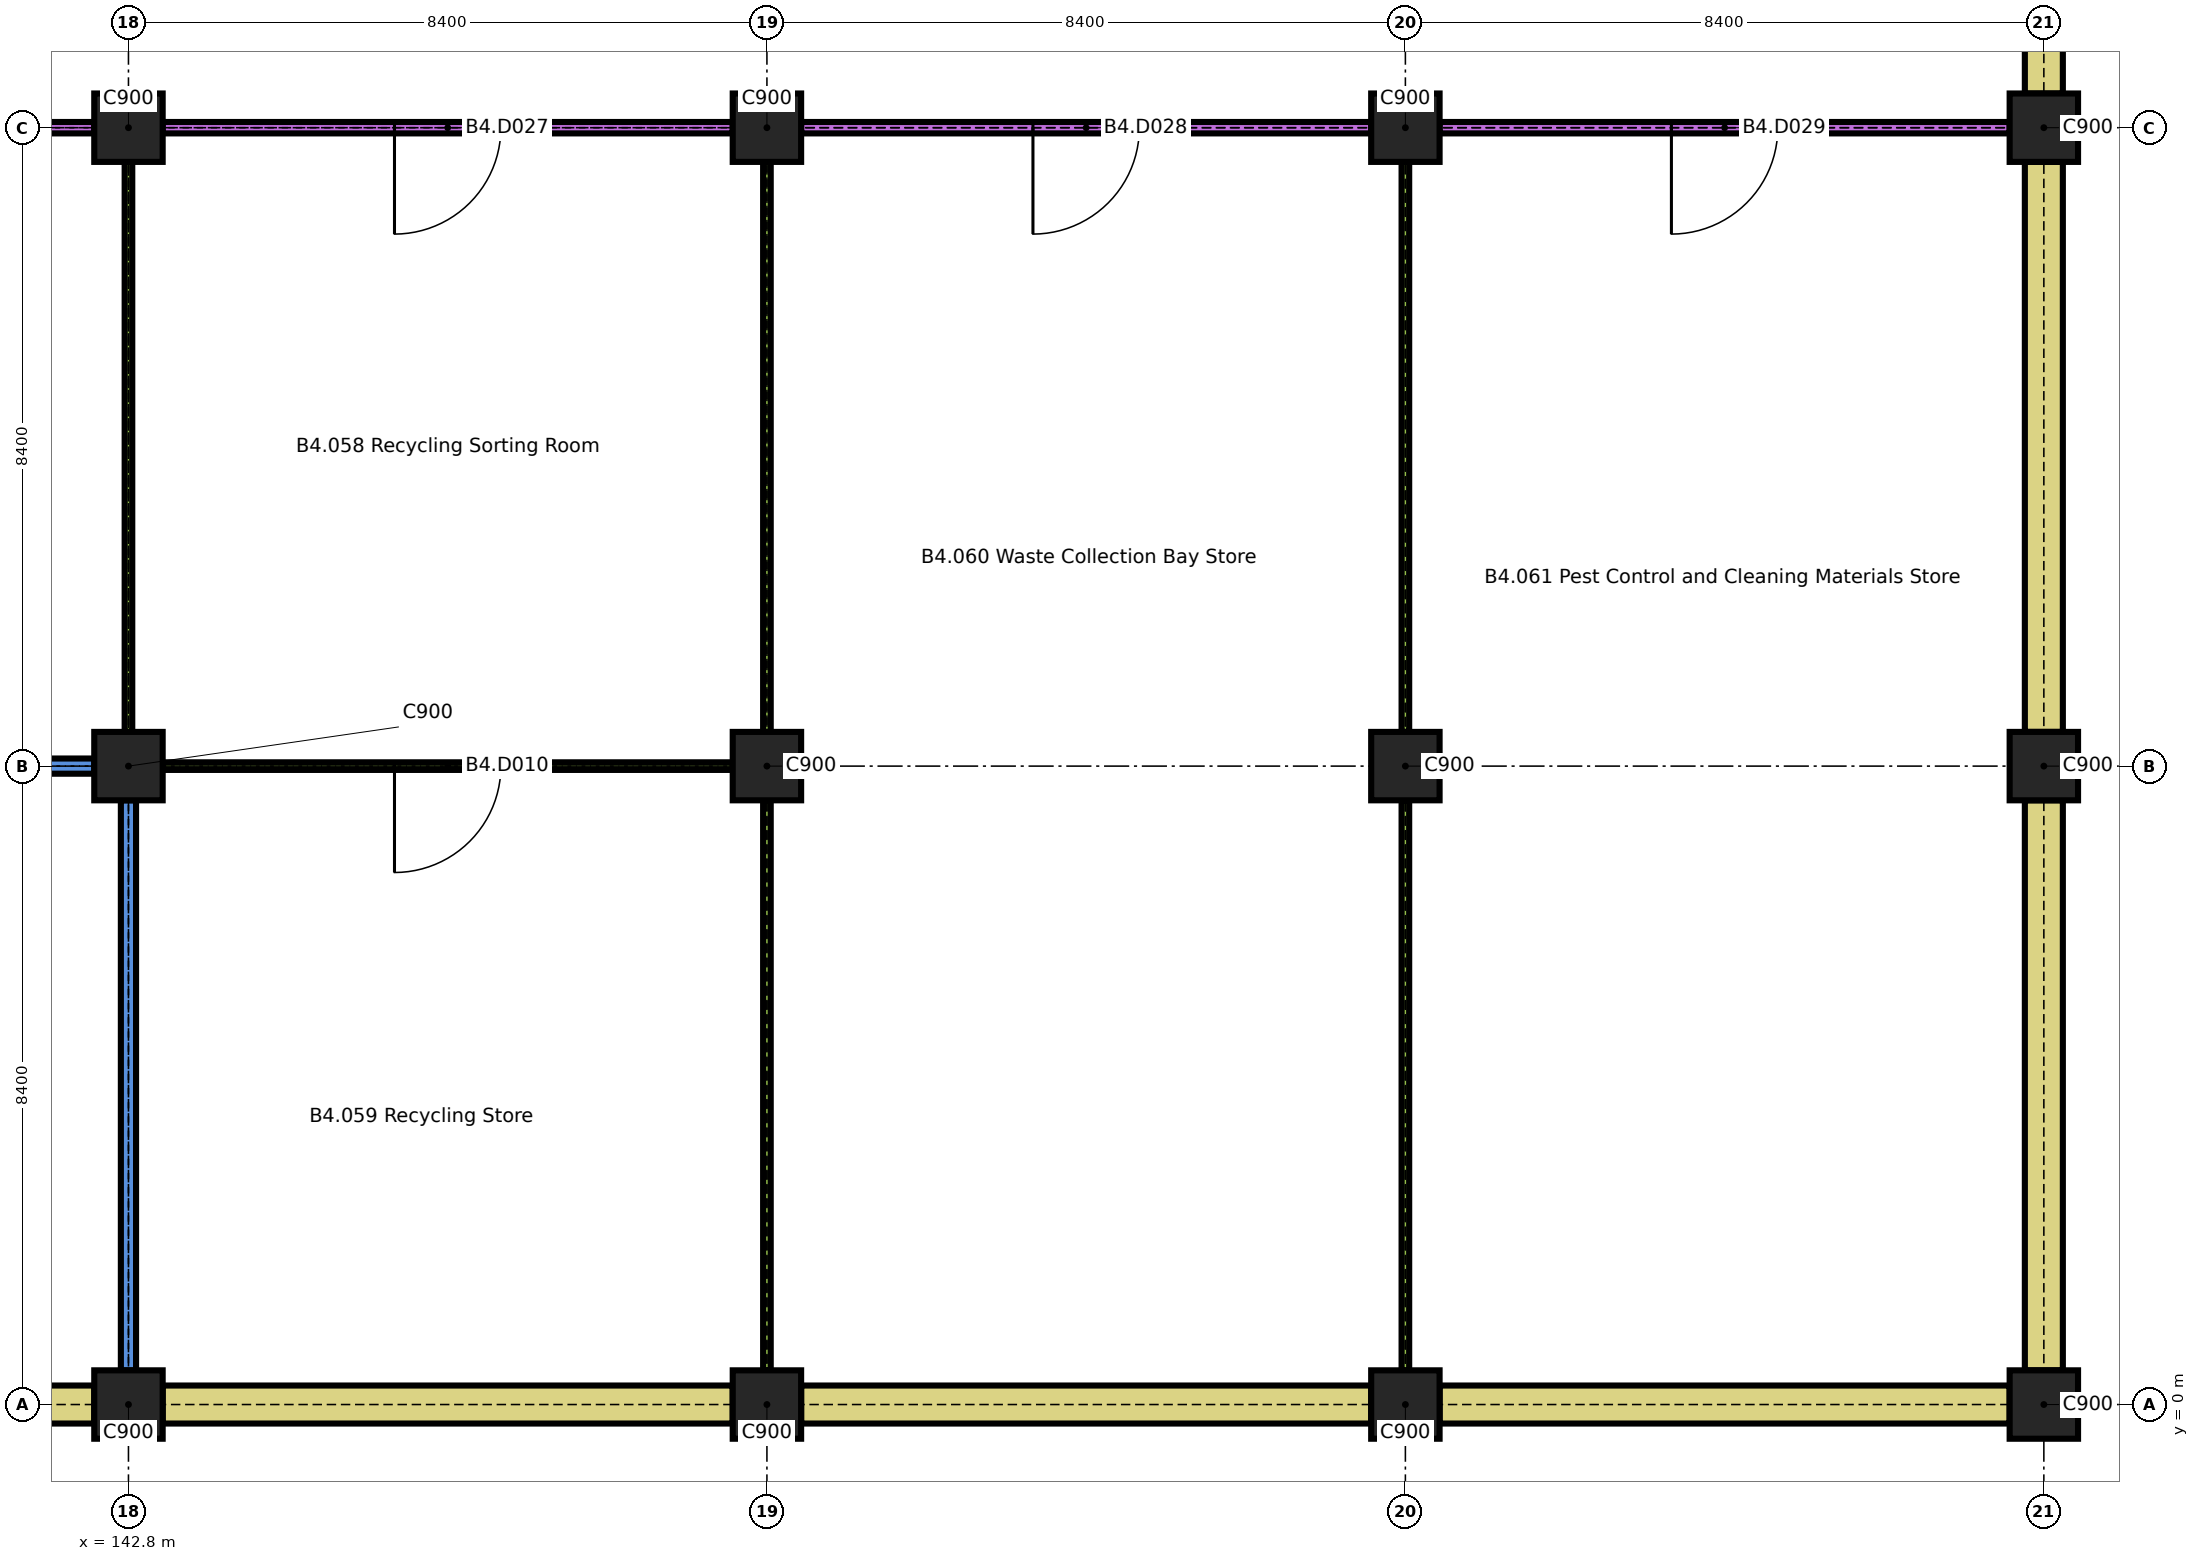
"""IFC4 building model, lengths in metres.
Left out: names, types, materials, properties, quantities, classifications, styles, units other than length and angle.
Written with IfcOpenShell. Run it as: python <this file> out.ifc"""

import sys

from ifc_helpers import new_model, si_unit, direction, frame, frame_2d, origin, origin_2d, place, context, subcontext, project, spatial, rectangle, extrude, element, fill, save


model = new_model("IFC4")
c1 = context("Model", 3, precision=1e-05, world=origin(), true_north=direction((0.0, 1.0)))
c2 = subcontext(c1, "Body", "Model", "MODEL_VIEW")
j1 = project(units=[si_unit("LENGTHUNIT", "METRE"), si_unit("PLANEANGLEUNIT", "RADIAN")], contexts=[c1])
p1 = place(None, origin())
s1 = spatial("IfcSite", under=j1, at=p1, CompositionType="ELEMENT")
p2 = place(p1, origin())
s2 = spatial("IfcBuilding", under=s1, at=p2, CompositionType="ELEMENT")
p3 = place(p2, frame((0.0, 0.0, -15.0)))
s3 = spatial("IfcBuildingStorey", under=s2, at=p3, CompositionType="ELEMENT", Elevation=-15.0)
for number, where, z_axis, x_axis in (
    (1, (142.8, 0.0, 0.0), (0.0, 0.0, 1.0), (1.0, 0.0, 0.0)),
    (2, (151.2, 0.0, 0.0), (0.0, 0.0, 1.0), (1.0, 0.0, 0.0)),
    (3, (159.6, 0.0, 0.0), (0.0, 0.0, 1.0), (1.0, 0.0, 0.0)),
    (4, (168.0, 0.0, 0.0), (0.0, 0.0, 1.0), (1.0, 0.0, 0.0)),
    (5, (142.8, 8.4, 0.0), (0.0, 0.0, 1.0), (1.0, 0.0, 0.0)),
    (6, (151.2, 8.4, 0.0), (0.0, 0.0, 1.0), (1.0, 0.0, 0.0)),
    (7, (159.6, 8.4, 0.0), (0.0, 0.0, 1.0), (1.0, 0.0, 0.0)),
    (8, (168.0, 8.4, 0.0), (0.0, 0.0, 1.0), (1.0, 0.0, 0.0)),
    (9, (142.8, 16.8, 0.0), (0.0, 0.0, 1.0), (1.0, 0.0, 0.0)),
    (10, (151.2, 16.8, 0.0), (0.0, 0.0, 1.0), (1.0, 0.0, 0.0)),
    (11, (159.6, 16.8, 0.0), (0.0, 0.0, 1.0), (1.0, 0.0, 0.0)),
    (12, (168.0, 16.8, 0.0), (0.0, 0.0, 1.0), (1.0, 0.0, 0.0)),
):
    element("IfcColumn", number, at=place(p3, frame(where, z_axis=z_axis, x_axis=x_axis)), inside=s3, PredefinedType="COLUMN", context=c2, shape_type="SweptSolid", body=[
        extrude(rectangle(XDim=0.9, YDim=0.9, at=origin_2d()), origin(), (0.0, 0.0, 1.0), 3.2),
    ])
for number, where, z_axis, x_axis in (
    (13, (134.85, 0.0, 0.0), (0.0, 0.0, 1.0), (1.0, 0.0, 0.0)),
    (14, (143.25, 0.0, 0.0), (0.0, 0.0, 1.0), (1.0, 0.0, 0.0)),
    (15, (151.65, 0.0, 0.0), (0.0, 0.0, 1.0), (1.0, 0.0, 0.0)),
    (16, (160.05, 0.0, 0.0), (0.0, 0.0, 1.0), (1.0, 0.0, 0.0)),
    (17, (168.0, 0.45, 0.0), (0.0, 0.0, 1.0), (0.0, 1.0, 0.0)),
    (18, (168.0, 8.85, 0.0), (0.0, 0.0, 1.0), (0.0, 1.0, 0.0)),
):
    element("IfcWall", number, at=place(p3, frame(where, z_axis=z_axis, x_axis=x_axis)), inside=s3, PredefinedType="SOLIDWALL", context=c2, shape_type="SweptSolid", body=[
        extrude(rectangle(XDim=7.5, YDim=0.5, at=frame_2d((3.75, 0.0))), origin(), (0.0, 0.0, 1.0), 3.2),
    ])
p4 = place(p3, frame((168.0, 17.25, 0.0), z_axis=(0.0, 0.0, 1.0), x_axis=(0.0, 1.0, 0.0)))
e19 = element("IfcWall", 19, at=p4, inside=s3, PredefinedType="SOLIDWALL", context=c2, shape_type="SweptSolid", body=[
    extrude(rectangle(XDim=16.6, YDim=0.5, at=frame_2d((8.3, 0.0))), origin(), (0.0, 0.0, 1.0), 3.2),
])
p5 = place(p3, frame((134.85, 8.4, 0.0), z_axis=(0.0, 0.0, 1.0), x_axis=(1.0, 0.0, 0.0)))
e20 = element("IfcWall", 20, at=p5, inside=s3, PredefinedType="PARTITIONING", context=c2, shape_type="SweptSolid", body=[
    extrude(rectangle(XDim=7.5, YDim=0.2, at=frame_2d((3.75, 0.0))), origin(), (0.0, 0.0, 1.0), 3.2),
])
p6 = place(p5, frame((3.05, 0.0, 0.0)))
e21 = element("IfcOpeningElement", 21, at=p6, cuts=e20, PredefinedType="OPENING", context=c2, shape_type="SweptSolid", body=[
    extrude(rectangle(XDim=1.4, YDim=2.1, at=frame_2d((0.7, 1.05))), frame((0.0, 0.11, 0.0), z_axis=(0.0, -1.0, 0.0), x_axis=(1.0, 0.0, 0.0)), (0.0, 0.0, 1.0), 0.22),
])
p7 = place(p3, frame((143.25, 8.4, 0.0), z_axis=(0.0, 0.0, 1.0), x_axis=(1.0, 0.0, 0.0)))
e22 = element("IfcWall", 22, at=p7, inside=s3, PredefinedType="PARTITIONING", context=c2, shape_type="SweptSolid", body=[
    extrude(rectangle(XDim=7.5, YDim=0.1, at=frame_2d((3.75, 0.0))), origin(), (0.0, 0.0, 1.0), 3.2),
])
p8 = place(p7, frame((3.05, 0.0, 0.0)))
e23 = element("IfcOpeningElement", 23, at=p8, cuts=e22, PredefinedType="OPENING", context=c2, shape_type="SweptSolid", body=[
    extrude(rectangle(XDim=1.4, YDim=2.1, at=frame_2d((0.7, 1.05))), frame((0.0, 0.06, 0.0), z_axis=(0.0, -1.0, 0.0), x_axis=(1.0, 0.0, 0.0)), (0.0, 0.0, 1.0), 0.12),
])
p9 = place(p3, frame((134.85, 16.8, 0.0), z_axis=(0.0, 0.0, 1.0), x_axis=(1.0, 0.0, 0.0)))
e24 = element("IfcWall", 24, at=p9, inside=s3, PredefinedType="PARTITIONING", context=c2, shape_type="SweptSolid", body=[
    extrude(rectangle(XDim=7.5, YDim=0.15, at=frame_2d((3.75, 0.0))), origin(), (0.0, 0.0, 1.0), 3.2),
])
p10 = place(p9, frame((3.05, 0.0, 0.0)))
e25 = element("IfcOpeningElement", 25, at=p10, cuts=e24, PredefinedType="OPENING", context=c2, shape_type="SweptSolid", body=[
    extrude(rectangle(XDim=1.4, YDim=2.1, at=frame_2d((0.7, 1.05))), frame((0.0, 0.085, 0.0), z_axis=(0.0, -1.0, 0.0), x_axis=(1.0, 0.0, 0.0)), (0.0, 0.0, 1.0), 0.17),
])
p11 = place(p3, frame((143.25, 16.8, 0.0), z_axis=(0.0, 0.0, 1.0), x_axis=(1.0, 0.0, 0.0)))
e26 = element("IfcWall", 26, at=p11, inside=s3, PredefinedType="PARTITIONING", context=c2, shape_type="SweptSolid", body=[
    extrude(rectangle(XDim=7.5, YDim=0.15, at=frame_2d((3.75, 0.0))), origin(), (0.0, 0.0, 1.0), 3.2),
])
p12 = place(p11, frame((3.05, 0.0, 0.0)))
e27 = element("IfcOpeningElement", 27, at=p12, cuts=e26, PredefinedType="OPENING", context=c2, shape_type="SweptSolid", body=[
    extrude(rectangle(XDim=1.4, YDim=2.1, at=frame_2d((0.7, 1.05))), frame((0.0, 0.085, 0.0), z_axis=(0.0, -1.0, 0.0), x_axis=(1.0, 0.0, 0.0)), (0.0, 0.0, 1.0), 0.17),
])
p13 = place(p3, frame((151.65, 16.8, 0.0), z_axis=(0.0, 0.0, 1.0), x_axis=(1.0, 0.0, 0.0)))
e28 = element("IfcWall", 28, at=p13, inside=s3, PredefinedType="PARTITIONING", context=c2, shape_type="SweptSolid", body=[
    extrude(rectangle(XDim=7.5, YDim=0.15, at=frame_2d((3.75, 0.0))), origin(), (0.0, 0.0, 1.0), 3.2),
])
p14 = place(p13, frame((3.05, 0.0, 0.0)))
e29 = element("IfcOpeningElement", 29, at=p14, cuts=e28, PredefinedType="OPENING", context=c2, shape_type="SweptSolid", body=[
    extrude(rectangle(XDim=1.4, YDim=2.1, at=frame_2d((0.7, 1.05))), frame((0.0, 0.085, 0.0), z_axis=(0.0, -1.0, 0.0), x_axis=(1.0, 0.0, 0.0)), (0.0, 0.0, 1.0), 0.17),
])
p15 = place(p3, frame((160.05, 16.8, 0.0), z_axis=(0.0, 0.0, 1.0), x_axis=(1.0, 0.0, 0.0)))
e30 = element("IfcWall", 30, at=p15, inside=s3, PredefinedType="PARTITIONING", context=c2, shape_type="SweptSolid", body=[
    extrude(rectangle(XDim=7.5, YDim=0.15, at=frame_2d((3.75, 0.0))), origin(), (0.0, 0.0, 1.0), 3.2),
])
p16 = place(p15, frame((3.05, 0.0, 0.0)))
e31 = element("IfcOpeningElement", 31, at=p16, cuts=e30, PredefinedType="OPENING", context=c2, shape_type="SweptSolid", body=[
    extrude(rectangle(XDim=1.4, YDim=2.1, at=frame_2d((0.7, 1.05))), frame((0.0, 0.085, 0.0), z_axis=(0.0, -1.0, 0.0), x_axis=(1.0, 0.0, 0.0)), (0.0, 0.0, 1.0), 0.17),
])
p17 = place(p3, frame((142.8, 0.45, 0.0), z_axis=(0.0, 0.0, 1.0), x_axis=(0.0, 1.0, 0.0)))
e32 = element("IfcWall", 32, at=p17, inside=s3, PredefinedType="PARTITIONING", context=c2, shape_type="SweptSolid", body=[
    extrude(rectangle(XDim=7.5, YDim=0.2, at=frame_2d((3.75, 0.0))), origin(), (0.0, 0.0, 1.0), 3.2),
])
for number, where, z_axis, x_axis in (
    (33, (142.8, 8.85, 0.0), (0.0, 0.0, 1.0), (0.0, 1.0, 0.0)),
    (34, (151.2, 0.45, 0.0), (0.0, 0.0, 1.0), (0.0, 1.0, 0.0)),
    (35, (151.2, 8.85, 0.0), (0.0, 0.0, 1.0), (0.0, 1.0, 0.0)),
    (36, (159.6, 0.45, 0.0), (0.0, 0.0, 1.0), (0.0, 1.0, 0.0)),
    (37, (159.6, 8.85, 0.0), (0.0, 0.0, 1.0), (0.0, 1.0, 0.0)),
):
    element("IfcWall", number, at=place(p3, frame(where, z_axis=z_axis, x_axis=x_axis)), inside=s3, PredefinedType="PARTITIONING", context=c2, shape_type="SweptSolid", body=[
        extrude(rectangle(XDim=7.5, YDim=0.1, at=frame_2d((3.75, 0.0))), origin(), (0.0, 0.0, 1.0), 3.2),
    ])
p18 = place(p8, origin())
e38 = element("IfcDoor", 38, at=p18, inside=s3, OperationType="SINGLE_SWING_LEFT", PredefinedType="DOOR", context=c2, shape_type="SweptSolid", body=[
    extrude(rectangle(XDim=1.4, YDim=2.1, at=frame_2d((0.7, 1.05))), frame((0.0, 0.025, 0.0), z_axis=(0.0, -1.0, 0.0), x_axis=(1.0, 0.0, 0.0)), (0.0, 0.0, 1.0), 0.05),
])
fill(e23, e38)
p19 = place(p12, origin())
e39 = element("IfcDoor", 39, at=p19, inside=s3, OperationType="SINGLE_SWING_LEFT", PredefinedType="DOOR", context=c2, shape_type="SweptSolid", body=[
    extrude(rectangle(XDim=1.4, YDim=2.1, at=frame_2d((0.7, 1.05))), frame((0.0, 0.025, 0.0), z_axis=(0.0, -1.0, 0.0), x_axis=(1.0, 0.0, 0.0)), (0.0, 0.0, 1.0), 0.05),
])
fill(e27, e39)
p20 = place(p14, origin())
e40 = element("IfcDoor", 40, at=p20, inside=s3, OperationType="SINGLE_SWING_LEFT", PredefinedType="DOOR", context=c2, shape_type="SweptSolid", body=[
    extrude(rectangle(XDim=1.4, YDim=2.1, at=frame_2d((0.7, 1.05))), frame((0.0, 0.025, 0.0), z_axis=(0.0, -1.0, 0.0), x_axis=(1.0, 0.0, 0.0)), (0.0, 0.0, 1.0), 0.05),
])
fill(e29, e40)
p21 = place(p16, origin())
e41 = element("IfcDoor", 41, at=p21, inside=s3, OperationType="SINGLE_SWING_LEFT", PredefinedType="DOOR", context=c2, shape_type="SweptSolid", body=[
    extrude(rectangle(XDim=1.4, YDim=2.1, at=frame_2d((0.7, 1.05))), frame((0.0, 0.025, 0.0), z_axis=(0.0, -1.0, 0.0), x_axis=(1.0, 0.0, 0.0)), (0.0, 0.0, 1.0), 0.05),
])
fill(e31, e41)
save(model, sys.argv[1])
